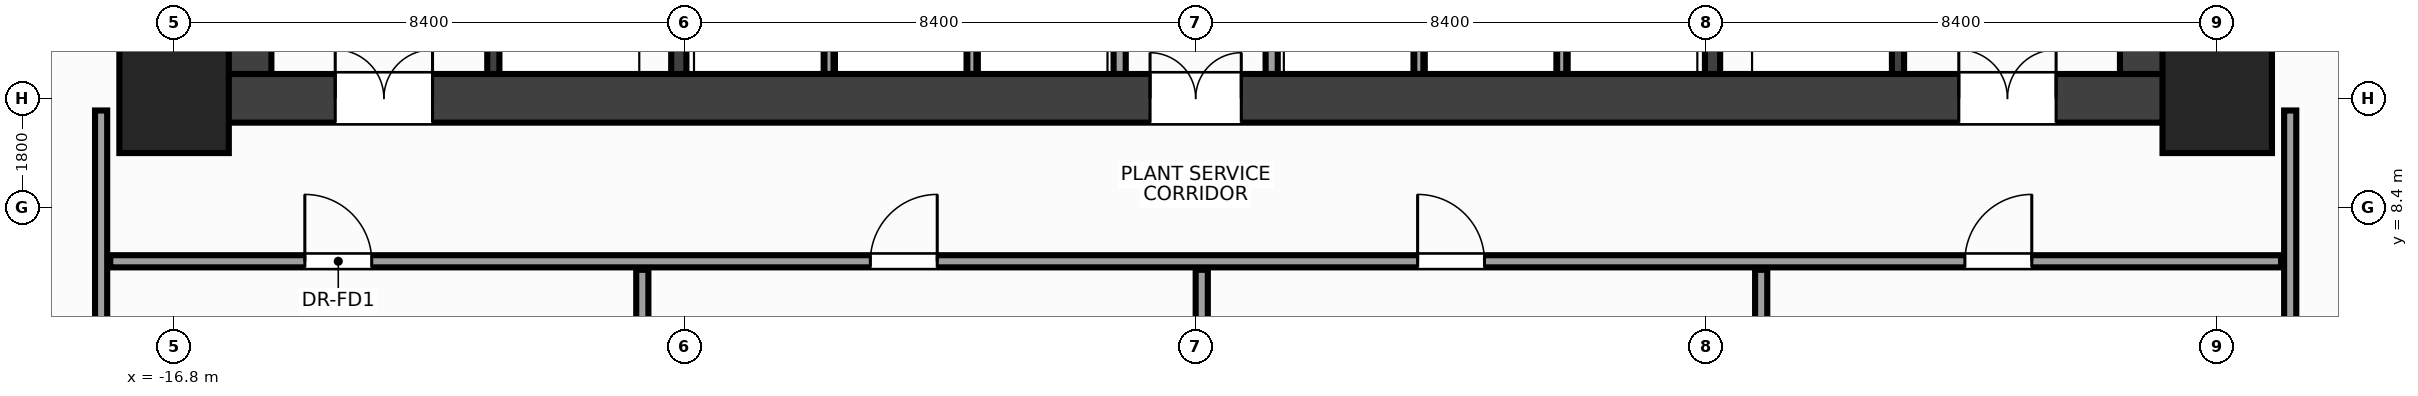
"""IFC4 building model, lengths in metres.
Left out: names, types, materials, properties, quantities, classifications, styles, units other than length and angle.
Written with IfcOpenShell. Run it as: python <this file> out.ifc"""

import sys

from ifc_helpers import new_model, si_unit, direction, frame, frame_2d, origin, origin_2d, place, context, subcontext, project, spatial, rectangle, extrude, source, transform, mapped, element, fill, save


model = new_model("IFC4")
c1 = context("Model", 3, precision=1e-05, world=origin(), true_north=direction((0.0, 1.0)))
c2 = subcontext(c1, "Body", "Model", "MODEL_VIEW")
j1 = project(units=[si_unit("LENGTHUNIT", "METRE"), si_unit("PLANEANGLEUNIT", "RADIAN")], contexts=[c1])
p1 = place(None, origin())
s1 = spatial("IfcSite", under=j1, at=p1, CompositionType="ELEMENT")
p2 = place(p1, origin())
s2 = spatial("IfcBuilding", under=s1, at=p2, CompositionType="ELEMENT")
p3 = place(p2, frame((0.0, 0.0, 70.4)))
s3 = spatial("IfcBuildingStorey", under=s2, at=p3, CompositionType="ELEMENT", Elevation=70.4)
m1 = source(origin(), c2, "Body", "SweptSolid", [
    extrude(rectangle(XDim=32.0, YDim=0.8, at=frame_2d((16.0, 0.0))), origin(), (0.0, 0.0, 1.0), 7.2),
])
p4 = place(p3, frame((-16.0, 10.2, 0.0), z_axis=(0.0, 0.0, 1.0), x_axis=(1.0, 0.0, 0.0)))
e1 = element("IfcWall", 1, at=p4, inside=s3, PredefinedType="SHEAR", context=c2, shape_type="MappedRepresentation", body=[
    mapped(m1, transform((0.0, 0.0, 0.0), x_axis=(1.0, 0.0, 0.0), y_axis=(0.0, 1.0, 0.0), z_axis=(0.0, 0.0, 1.0), scale=1.0)),
])
p5 = place(p4, frame((1.85, 0.0, 0.0)))
e2 = element("IfcOpeningElement", 2, at=p5, cuts=e1, PredefinedType="OPENING", context=c2, shape_type="SweptSolid", body=[
    extrude(rectangle(XDim=1.6, YDim=2.15, at=frame_2d((0.8, 1.075))), frame((0.0, 0.412, 0.0), z_axis=(0.0, -1.0, 0.0), x_axis=(1.0, 0.0, 0.0)), (0.0, 0.0, 1.0), 0.824),
])
p6 = place(p4, frame((28.55, 0.0, 0.0)))
e3 = element("IfcOpeningElement", 3, at=p6, cuts=e1, PredefinedType="OPENING", context=c2, shape_type="SweptSolid", body=[
    extrude(rectangle(XDim=1.6, YDim=2.15, at=frame_2d((0.8, 1.075))), frame((0.0, 0.412, 0.0), z_axis=(0.0, -1.0, 0.0), x_axis=(1.0, 0.0, 0.0)), (0.0, 0.0, 1.0), 0.824),
])
p7 = place(p4, frame((15.25, 0.0, 0.0)))
e4 = element("IfcOpeningElement", 4, at=p7, cuts=e1, PredefinedType="OPENING", context=c2, shape_type="SweptSolid", body=[
    extrude(rectangle(XDim=1.5, YDim=2.2, at=frame_2d((0.75, 1.1))), frame((0.0, 0.412, 0.0), z_axis=(0.0, -1.0, 0.0), x_axis=(1.0, 0.0, 0.0)), (0.0, 0.0, 1.0), 0.824),
])
m2 = source(origin(), c2, "Body", "SweptSolid", [
    extrude(rectangle(XDim=12.8, YDim=0.8, at=frame_2d((6.4, 0.0))), origin(), (0.0, 0.0, 1.0), 7.2),
])
for number, where, z_axis, x_axis in (
    (5, (-15.6, 10.6, 0.0), (0.0, 0.0, 1.0), (0.0, 1.0, 0.0)),
    (6, (15.6, 10.6, 0.0), (0.0, 0.0, 1.0), (0.0, 1.0, 0.0)),
):
    element("IfcWall", number, at=place(p3, frame(where, z_axis=z_axis, x_axis=x_axis)), inside=s3, PredefinedType="SHEAR", context=c2, shape_type="MappedRepresentation", body=[
        mapped(m2, transform((0.0, 0.0, 0.0), x_axis=(1.0, 0.0, 0.0), y_axis=(0.0, 1.0, 0.0), z_axis=(0.0, 0.0, 1.0), scale=1.0)),
    ])
m3 = source(origin(), c2, "Body", "SweptSolid", [
    extrude(rectangle(XDim=12.8, YDim=0.25, at=frame_2d((6.4, 0.0))), origin(), (0.0, 0.0, 1.0), 7.2),
])
p8 = place(p3, frame((-8.5, 10.6, 0.0), z_axis=(0.0, 0.0, 1.0), x_axis=(0.0, 1.0, 0.0)))
e7 = element("IfcWall", 7, at=p8, inside=s3, PredefinedType="SHEAR", context=c2, shape_type="MappedRepresentation", body=[
    mapped(m3, transform((0.0, 0.0, 0.0), x_axis=(1.0, 0.0, 0.0), y_axis=(0.0, 1.0, 0.0), z_axis=(0.0, 0.0, 1.0), scale=1.0)),
])
p9 = place(p8, frame((5.9, 0.0, 0.0)))
e8 = element("IfcOpeningElement", 8, at=p9, cuts=e7, PredefinedType="OPENING", context=c2, shape_type="SweptSolid", body=[
    extrude(rectangle(XDim=0.95, YDim=2.15, at=frame_2d((0.475, 1.075))), frame((0.0, 0.137, 0.0), z_axis=(0.0, -1.0, 0.0), x_axis=(1.0, 0.0, 0.0)), (0.0, 0.0, 1.0), 0.274),
])
p10 = place(p3, frame((8.5, 10.6, 0.0), z_axis=(0.0, 0.0, 1.0), x_axis=(0.0, 1.0, 0.0)))
e9 = element("IfcWall", 9, at=p10, inside=s3, PredefinedType="SHEAR", context=c2, shape_type="MappedRepresentation", body=[
    mapped(m3, transform((0.0, 0.0, 0.0), x_axis=(1.0, 0.0, 0.0), y_axis=(0.0, 1.0, 0.0), z_axis=(0.0, 0.0, 1.0), scale=1.0)),
])
p11 = place(p10, frame((9.85, 0.0, 0.0)))
e10 = element("IfcOpeningElement", 10, at=p11, cuts=e9, PredefinedType="OPENING", context=c2, shape_type="SweptSolid", body=[
    extrude(rectangle(XDim=0.95, YDim=2.15, at=frame_2d((0.475, 1.075))), frame((0.0, 0.137, 0.0), z_axis=(0.0, -1.0, 0.0), x_axis=(1.0, 0.0, 0.0)), (0.0, 0.0, 1.0), 0.274),
])
m4 = source(origin(), c2, "Body", "SweptSolid", [
    extrude(rectangle(XDim=3.05, YDim=0.2, at=frame_2d((1.525, 0.0))), origin(), (0.0, 0.0, 1.0), 7.2),
])
p12 = place(p3, frame((-11.55, 10.6, 0.0), z_axis=(0.0, 0.0, 1.0), x_axis=(0.0, 1.0, 0.0)))
e11 = element("IfcWall", 11, at=p12, inside=s3, PredefinedType="SHEAR", context=c2, shape_type="MappedRepresentation", body=[
    mapped(m4, transform((0.0, 0.0, 0.0), x_axis=(1.0, 0.0, 0.0), y_axis=(0.0, 1.0, 0.0), z_axis=(0.0, 0.0, 1.0), scale=1.0)),
])
p13 = place(p12, frame((0.9, 0.0, 0.0)))
e12 = element("IfcOpeningElement", 12, at=p13, cuts=e11, PredefinedType="OPENING", context=c2, shape_type="SweptSolid", body=[
    extrude(rectangle(XDim=1.1, YDim=2.15, at=frame_2d((0.55, 1.075))), frame((0.0, 0.112, 0.0), z_axis=(0.0, -1.0, 0.0), x_axis=(1.0, 0.0, 0.0)), (0.0, 0.0, 1.0), 0.224),
])
p14 = place(p3, frame((11.55, 10.6, 0.0), z_axis=(0.0, 0.0, 1.0), x_axis=(0.0, 1.0, 0.0)))
e13 = element("IfcWall", 13, at=p14, inside=s3, PredefinedType="SHEAR", context=c2, shape_type="MappedRepresentation", body=[
    mapped(m4, transform((0.0, 0.0, 0.0), x_axis=(1.0, 0.0, 0.0), y_axis=(0.0, 1.0, 0.0), z_axis=(0.0, 0.0, 1.0), scale=1.0)),
])
p15 = place(p14, frame((0.9, 0.0, 0.0)))
e14 = element("IfcOpeningElement", 14, at=p15, cuts=e13, PredefinedType="OPENING", context=c2, shape_type="SweptSolid", body=[
    extrude(rectangle(XDim=1.1, YDim=2.15, at=frame_2d((0.55, 1.075))), frame((0.0, 0.112, 0.0), z_axis=(0.0, -1.0, 0.0), x_axis=(1.0, 0.0, 0.0)), (0.0, 0.0, 1.0), 0.224),
])
m5 = source(origin(), c2, "Body", "SweptSolid", [
    extrude(rectangle(XDim=1.8, YDim=1.8, at=origin_2d()), origin(), (0.0, 0.0, 1.0), 7.2),
])
for number, where, z_axis, x_axis in (
    (15, (-16.8, 10.2, 0.0), (0.0, 0.0, 1.0), (1.0, 0.0, 0.0)),
    (16, (16.8, 10.2, 0.0), (0.0, 0.0, 1.0), (1.0, 0.0, 0.0)),
):
    element("IfcColumn", number, at=place(p3, frame(where, z_axis=z_axis, x_axis=x_axis)), inside=s3, PredefinedType="COLUMN", context=c2, shape_type="MappedRepresentation", body=[
        mapped(m5, transform((0.0, 0.0, 0.0), x_axis=(1.0, 0.0, 0.0), y_axis=(0.0, 1.0, 0.0), z_axis=(0.0, 0.0, 1.0), scale=1.0)),
    ])
m6 = source(origin(), c2, "Body", "SweptSolid", [
    extrude(rectangle(XDim=3.34, YDim=0.2, at=frame_2d((1.67, 0.0))), origin(), (0.0, 0.0, 1.0), 6.9),
])
for number, where, z_axis, x_axis in (
    (17, (-1.25, 10.6, 0.0), (0.0, 0.0, 1.0), (0.0, 1.0, 0.0)),
    (18, (1.25, 10.6, 0.0), (0.0, 0.0, 1.0), (0.0, 1.0, 0.0)),
):
    element("IfcWall", number, at=place(p3, frame(where, z_axis=z_axis, x_axis=x_axis)), inside=s3, PredefinedType="PARTITIONING", context=c2, shape_type="MappedRepresentation", body=[
        mapped(m6, transform((0.0, 0.0, 0.0), x_axis=(1.0, 0.0, 0.0), y_axis=(0.0, 1.0, 0.0), z_axis=(0.0, 0.0, 1.0), scale=1.0)),
    ])
m7 = source(origin(), c2, "Body", "SweptSolid", [
    extrude(rectangle(XDim=3.34, YDim=0.15, at=frame_2d((1.67, 0.0))), origin(), (0.0, 0.0, 1.0), 6.9),
])
for number, where, z_axis, x_axis in (
    (19, (-6.03, 10.6, 0.0), (0.0, 0.0, 1.0), (0.0, 1.0, 0.0)),
    (20, (-3.68, 10.6, 0.0), (0.0, 0.0, 1.0), (0.0, 1.0, 0.0)),
    (21, (3.67, 10.6, 0.0), (0.0, 0.0, 1.0), (0.0, 1.0, 0.0)),
    (22, (6.02, 10.6, 0.0), (0.0, 0.0, 1.0), (0.0, 1.0, 0.0)),
):
    element("IfcWall", number, at=place(p3, frame(where, z_axis=z_axis, x_axis=x_axis)), inside=s3, PredefinedType="PARTITIONING", context=c2, shape_type="MappedRepresentation", body=[
        mapped(m7, transform((0.0, 0.0, 0.0), x_axis=(1.0, 0.0, 0.0), y_axis=(0.0, 1.0, 0.0), z_axis=(0.0, 0.0, 1.0), scale=1.0)),
    ])
m8 = source(origin(), c2, "Body", "SweptSolid", [
    extrude(rectangle(XDim=22.85, YDim=0.2, at=frame_2d((11.425, 0.0))), origin(), (0.0, 0.0, 1.0), 6.285),
])
for number, where, z_axis, x_axis in (
    (23, (-18.0, -12.85, 0.0), (0.0, 0.0, 1.0), (0.0, 1.0, 0.0)),
    (24, (18.0, -12.85, 0.0), (0.0, 0.0, 1.0), (0.0, 1.0, 0.0)),
):
    element("IfcWall", number, at=place(p3, frame(where, z_axis=z_axis, x_axis=x_axis)), inside=s3, PredefinedType="PARTITIONING", context=c2, shape_type="MappedRepresentation", body=[
        mapped(m8, transform((0.0, 0.0, 0.0), x_axis=(1.0, 0.0, 0.0), y_axis=(0.0, 1.0, 0.0), z_axis=(0.0, 0.0, 1.0), scale=1.0)),
    ])
m9 = source(origin(), c2, "Body", "SweptSolid", [
    extrude(rectangle(XDim=35.7, YDim=0.2, at=frame_2d((17.85, 0.0))), origin(), (0.0, 0.0, 1.0), 6.285),
])
p16 = place(p3, frame((-17.85, 7.52, 0.0), z_axis=(0.0, 0.0, 1.0), x_axis=(1.0, 0.0, 0.0)))
e25 = element("IfcWall", 25, at=p16, inside=s3, PredefinedType="PARTITIONING", context=c2, shape_type="MappedRepresentation", body=[
    mapped(m9, transform((0.0, 0.0, 0.0), x_axis=(1.0, 0.0, 0.0), y_axis=(0.0, 1.0, 0.0), z_axis=(0.0, 0.0, 1.0), scale=1.0)),
])
p17 = place(p16, frame((3.2, 0.0, 0.0)))
e26 = element("IfcOpeningElement", 26, at=p17, cuts=e25, PredefinedType="OPENING", context=c2, shape_type="SweptSolid", body=[
    extrude(rectangle(XDim=1.1, YDim=2.15, at=frame_2d((0.55, 1.075))), frame((0.0, 0.112, 0.0), z_axis=(0.0, -1.0, 0.0), x_axis=(1.0, 0.0, 0.0)), (0.0, 0.0, 1.0), 0.224),
])
p18 = place(p16, frame((12.5, 0.0, 0.0)))
e27 = element("IfcOpeningElement", 27, at=p18, cuts=e25, PredefinedType="OPENING", context=c2, shape_type="SweptSolid", body=[
    extrude(rectangle(XDim=1.1, YDim=2.15, at=frame_2d((0.55, 1.075))), frame((0.0, 0.112, 0.0), z_axis=(0.0, -1.0, 0.0), x_axis=(1.0, 0.0, 0.0)), (0.0, 0.0, 1.0), 0.224),
])
p19 = place(p16, frame((21.5, 0.0, 0.0)))
e28 = element("IfcOpeningElement", 28, at=p19, cuts=e25, PredefinedType="OPENING", context=c2, shape_type="SweptSolid", body=[
    extrude(rectangle(XDim=1.1, YDim=2.15, at=frame_2d((0.55, 1.075))), frame((0.0, 0.112, 0.0), z_axis=(0.0, -1.0, 0.0), x_axis=(1.0, 0.0, 0.0)), (0.0, 0.0, 1.0), 0.224),
])
p20 = place(p16, frame((30.5, 0.0, 0.0)))
e29 = element("IfcOpeningElement", 29, at=p20, cuts=e25, PredefinedType="OPENING", context=c2, shape_type="SweptSolid", body=[
    extrude(rectangle(XDim=1.1, YDim=2.15, at=frame_2d((0.55, 1.075))), frame((0.0, 0.112, 0.0), z_axis=(0.0, -1.0, 0.0), x_axis=(1.0, 0.0, 0.0)), (0.0, 0.0, 1.0), 0.224),
])
m10 = source(origin(), c2, "Body", "SweptSolid", [
    extrude(rectangle(XDim=20.23, YDim=0.2, at=frame_2d((10.115, 0.0))), origin(), (0.0, 0.0, 1.0), 6.185),
])
for number, where, z_axis, x_axis in (
    (30, (-9.1, -12.85, 0.0), (0.0, 0.0, 1.0), (0.0, 1.0, 0.0)),
    (31, (0.1, -12.85, 0.0), (0.0, 0.0, 1.0), (0.0, 1.0, 0.0)),
):
    element("IfcWall", number, at=place(p3, frame(where, z_axis=z_axis, x_axis=x_axis)), inside=s3, PredefinedType="PARTITIONING", context=c2, shape_type="MappedRepresentation", body=[
        mapped(m10, transform((0.0, 0.0, 0.0), x_axis=(1.0, 0.0, 0.0), y_axis=(0.0, 1.0, 0.0), z_axis=(0.0, 0.0, 1.0), scale=1.0)),
    ])
p21 = place(p3, frame((9.3, -12.85, 0.0), z_axis=(0.0, 0.0, 1.0), x_axis=(0.0, 1.0, 0.0)))
e32 = element("IfcWall", 32, at=p21, inside=s3, PredefinedType="PARTITIONING", context=c2, shape_type="MappedRepresentation", body=[
    mapped(m10, transform((0.0, 0.0, 0.0), x_axis=(1.0, 0.0, 0.0), y_axis=(0.0, 1.0, 0.0), z_axis=(0.0, 0.0, 1.0), scale=1.0)),
])
p22 = place(p21, frame((5.2, 0.0, 0.0)))
e33 = element("IfcOpeningElement", 33, at=p22, cuts=e32, PredefinedType="OPENING", context=c2, shape_type="SweptSolid", body=[
    extrude(rectangle(XDim=1.1, YDim=2.15, at=frame_2d((0.55, 1.075))), frame((0.0, 0.112, 0.0), z_axis=(0.0, -1.0, 0.0), x_axis=(1.0, 0.0, 0.0)), (0.0, 0.0, 1.0), 0.224),
])
m11 = source(origin(), c2, "Body", "SweptSolid", [
    extrude(rectangle(XDim=1.6, YDim=2.15, at=frame_2d((0.8, 1.075))), frame((0.0, 0.025, 0.0), z_axis=(0.0, -1.0, 0.0), x_axis=(1.0, 0.0, 0.0)), (0.0, 0.0, 1.0), 0.05),
])
p23 = place(p5, origin())
e34 = element("IfcDoor", 34, at=p23, inside=s3, OperationType="DOUBLE_DOOR_SINGLE_SWING", PredefinedType="DOOR", context=c2, shape_type="MappedRepresentation", body=[
    mapped(m11, transform((0.0, 0.0, 0.0), x_axis=(1.0, 0.0, 0.0), y_axis=(0.0, 1.0, 0.0), z_axis=(0.0, 0.0, 1.0), scale=1.0)),
])
fill(e2, e34)
p24 = place(p6, origin())
e35 = element("IfcDoor", 35, at=p24, inside=s3, OperationType="DOUBLE_DOOR_SINGLE_SWING", PredefinedType="DOOR", context=c2, shape_type="MappedRepresentation", body=[
    mapped(m11, transform((0.0, 0.0, 0.0), x_axis=(1.0, 0.0, 0.0), y_axis=(0.0, 1.0, 0.0), z_axis=(0.0, 0.0, 1.0), scale=1.0)),
])
fill(e3, e35)
m12 = source(origin(), c2, "Body", "SweptSolid", [
    extrude(rectangle(XDim=1.5, YDim=2.2, at=frame_2d((0.75, 1.1))), frame((0.0, 0.025, 0.0), z_axis=(0.0, -1.0, 0.0), x_axis=(1.0, 0.0, 0.0)), (0.0, 0.0, 1.0), 0.05),
])
p25 = place(p7, origin())
e36 = element("IfcDoor", 36, at=p25, inside=s3, OperationType="DOUBLE_DOOR_SINGLE_SWING", PredefinedType="DOOR", context=c2, shape_type="MappedRepresentation", body=[
    mapped(m12, transform((0.0, 0.0, 0.0), x_axis=(1.0, 0.0, 0.0), y_axis=(0.0, 1.0, 0.0), z_axis=(0.0, 0.0, 1.0), scale=1.0)),
])
fill(e4, e36)
m13 = source(origin(), c2, "Body", "SweptSolid", [
    extrude(rectangle(XDim=1.1, YDim=2.15, at=frame_2d((0.55, 1.075))), frame((0.0, 0.025, 0.0), z_axis=(0.0, -1.0, 0.0), x_axis=(1.0, 0.0, 0.0)), (0.0, 0.0, 1.0), 0.05),
])
p26 = place(p17, origin())
e37 = element("IfcDoor", 37, at=p26, inside=s3, OperationType="SINGLE_SWING_LEFT", PredefinedType="DOOR", context=c2, shape_type="MappedRepresentation", body=[
    mapped(m13, transform((0.0, 0.0, 0.0), x_axis=(1.0, 0.0, 0.0), y_axis=(0.0, 1.0, 0.0), z_axis=(0.0, 0.0, 1.0), scale=1.0)),
])
fill(e26, e37)
p27 = place(p18, origin())
e38 = element("IfcDoor", 38, at=p27, inside=s3, OperationType="SINGLE_SWING_RIGHT", PredefinedType="DOOR", context=c2, shape_type="MappedRepresentation", body=[
    mapped(m13, transform((0.0, 0.0, 0.0), x_axis=(1.0, 0.0, 0.0), y_axis=(0.0, 1.0, 0.0), z_axis=(0.0, 0.0, 1.0), scale=1.0)),
])
fill(e27, e38)
p28 = place(p19, origin())
e39 = element("IfcDoor", 39, at=p28, inside=s3, OperationType="SINGLE_SWING_LEFT", PredefinedType="DOOR", context=c2, shape_type="MappedRepresentation", body=[
    mapped(m13, transform((0.0, 0.0, 0.0), x_axis=(1.0, 0.0, 0.0), y_axis=(0.0, 1.0, 0.0), z_axis=(0.0, 0.0, 1.0), scale=1.0)),
])
fill(e28, e39)
p29 = place(p20, origin())
e40 = element("IfcDoor", 40, at=p29, inside=s3, OperationType="SINGLE_SWING_RIGHT", PredefinedType="DOOR", context=c2, shape_type="MappedRepresentation", body=[
    mapped(m13, transform((0.0, 0.0, 0.0), x_axis=(1.0, 0.0, 0.0), y_axis=(0.0, 1.0, 0.0), z_axis=(0.0, 0.0, 1.0), scale=1.0)),
])
fill(e29, e40)
save(model, sys.argv[1])
